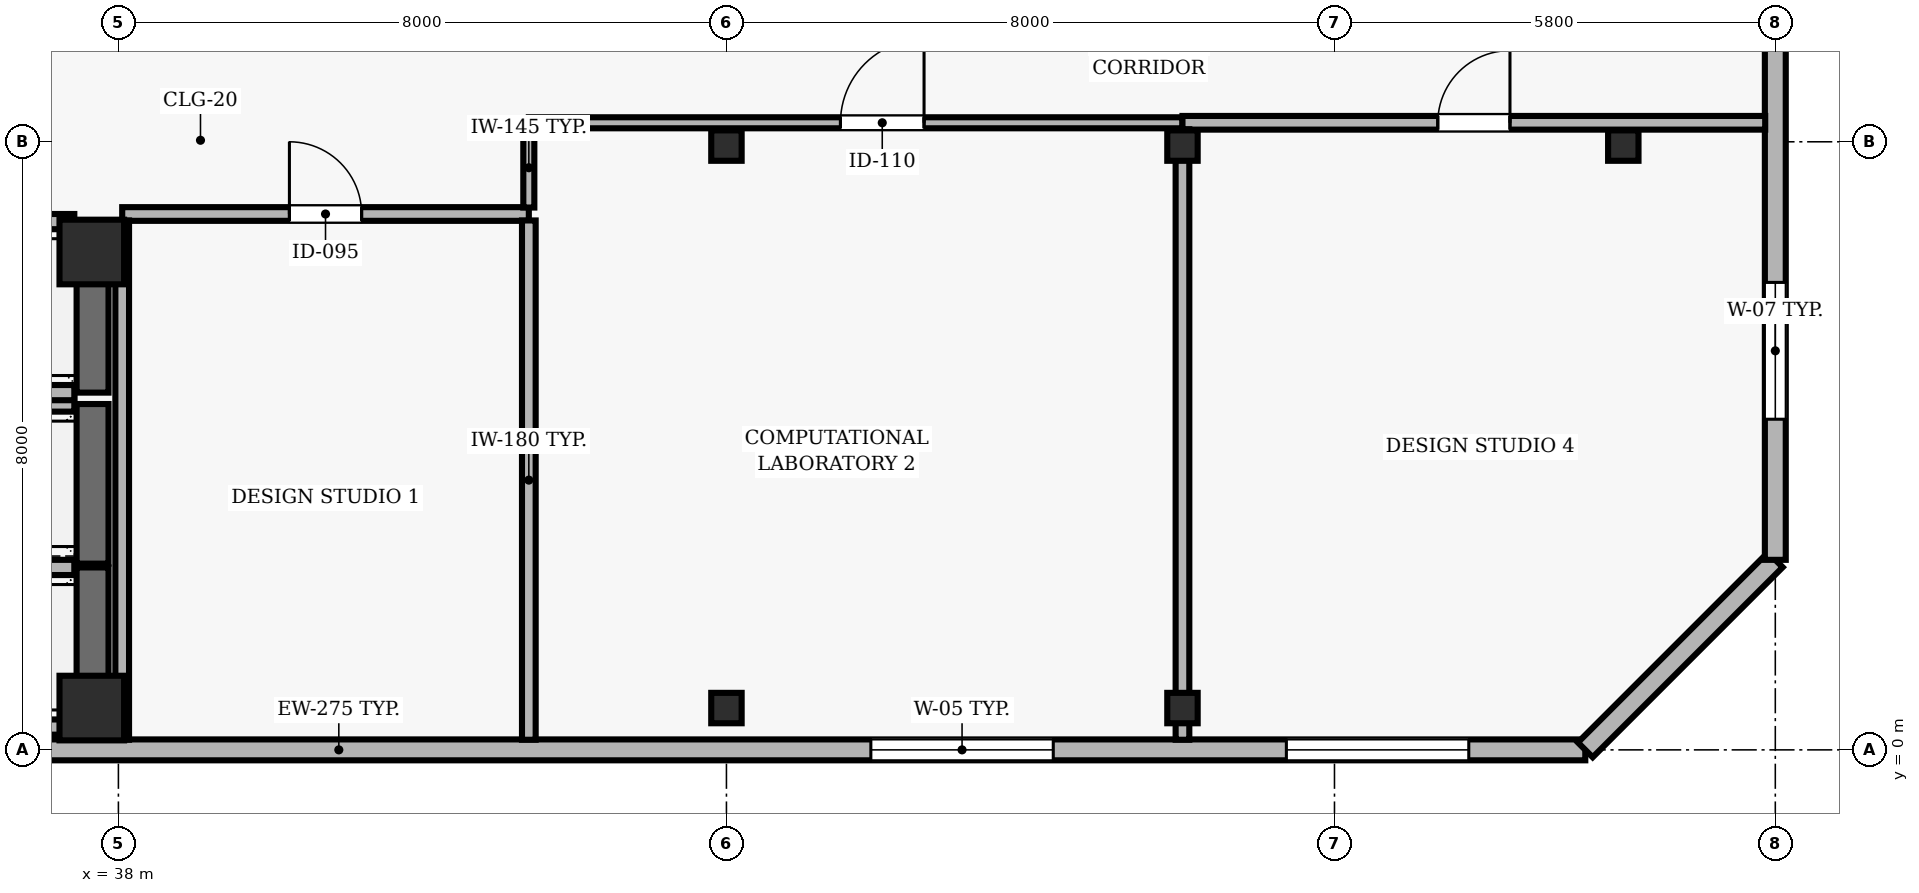
"""IFC4 building model, lengths in metres.
Left out: names, types, materials, properties, quantities, classifications, styles, units other than length and angle.
Written with IfcOpenShell. Run it as: python <this file> out.ifc"""

import sys

from ifc_helpers import new_model, si_unit, direction, frame, frame_2d, origin, origin_2d, place, context, subcontext, project, spatial, rectangle, hollow_rectangle, extrude, element, fill, save


model = new_model("IFC4")
c1 = context("Model", 3, precision=1e-05, world=origin(), true_north=direction((0.0, 1.0)))
c2 = subcontext(c1, "Body", "Model", "MODEL_VIEW")
j1 = project(units=[si_unit("LENGTHUNIT", "METRE"), si_unit("PLANEANGLEUNIT", "RADIAN")], contexts=[c1])
p1 = place(None, origin())
s1 = spatial("IfcSite", under=j1, at=p1, CompositionType="ELEMENT")
p2 = place(p1, origin())
s2 = spatial("IfcBuilding", under=s1, at=p2, CompositionType="ELEMENT")
p3 = place(p2, frame((0.0, 0.0, 263.8)))
s3 = spatial("IfcBuildingStorey", under=s2, at=p3, CompositionType="ELEMENT", Elevation=263.8)
for number, where, z_axis, x_axis in (
    (1, (37.65, 0.55, 0.0), (0.0, 0.0, 1.0), (1.0, 0.0, 0.0)),
    (2, (37.65, 6.55, 0.0), (0.0, 0.0, 1.0), (1.0, 0.0, 0.0)),
):
    element("IfcColumn", number, at=place(p3, frame(where, z_axis=z_axis, x_axis=x_axis)), inside=s3, PredefinedType="COLUMN", context=c2, shape_type="SweptSolid", body=[
        extrude(rectangle(XDim=0.85, YDim=0.85, at=origin_2d()), origin(), (0.0, 0.0, 1.0), 3.9),
    ])
for number, where, z_axis, x_axis in (
    (3, (46.0, 0.55, 0.0), (0.0, 0.0, 1.0), (1.0, 0.0, 0.0)),
    (4, (46.0, 7.95, 0.0), (0.0, 0.0, 1.0), (1.0, 0.0, 0.0)),
    (5, (52.0, 0.55, 0.0), (0.0, 0.0, 1.0), (1.0, 0.0, 0.0)),
    (6, (52.0, 7.95, 0.0), (0.0, 0.0, 1.0), (1.0, 0.0, 0.0)),
    (7, (57.8, 7.95, 0.0), (0.0, 0.0, 1.0), (1.0, 0.0, 0.0)),
):
    element("IfcColumn", number, at=place(p3, frame(where, z_axis=z_axis, x_axis=x_axis)), inside=s3, PredefinedType="COLUMN", context=c2, shape_type="SweptSolid", body=[
        extrude(hollow_rectangle(XDim=0.4, YDim=0.4, WallThickness=0.02, at=origin_2d()), origin(), (0.0, 0.0, 1.0), 3.9),
    ])
p4 = place(p3, frame((24.5, 0.0, 0.0), z_axis=(0.0, 0.0, 1.0), x_axis=(1.0, 0.0, 0.0)))
e8 = element("IfcWall", 8, at=p4, inside=s3, PredefinedType="SOLIDWALL", context=c2, shape_type="SweptSolid", body=[
    extrude(rectangle(XDim=32.8, YDim=0.275, at=frame_2d((16.4, 0.0))), origin(), (0.0, 0.0, 1.0), 3.69),
])
p5 = place(p4, frame((1.533, 0.0, 0.9)))
e9 = element("IfcOpeningElement", 9, at=p5, cuts=e8, PredefinedType="OPENING", context=c2, shape_type="SweptSolid", body=[
    extrude(rectangle(XDim=2.4, YDim=1.6, at=frame_2d((1.2, 0.8))), frame((0.0, 0.147, 0.0), z_axis=(0.0, -1.0, 0.0), x_axis=(1.0, 0.0, 0.0)), (0.0, 0.0, 1.0), 0.295),
])
p6 = place(p4, frame((23.4, 0.0, 0.9)))
e10 = element("IfcOpeningElement", 10, at=p6, cuts=e8, PredefinedType="OPENING", context=c2, shape_type="SweptSolid", body=[
    extrude(rectangle(XDim=2.4, YDim=1.6, at=frame_2d((1.2, 0.8))), frame((0.0, 0.147, 0.0), z_axis=(0.0, -1.0, 0.0), x_axis=(1.0, 0.0, 0.0)), (0.0, 0.0, 1.0), 0.295),
])
p7 = place(p4, frame((28.867, 0.0, 0.9)))
e11 = element("IfcOpeningElement", 11, at=p7, cuts=e8, PredefinedType="OPENING", context=c2, shape_type="SweptSolid", body=[
    extrude(rectangle(XDim=2.4, YDim=1.6, at=frame_2d((1.2, 0.8))), frame((0.0, 0.147, 0.0), z_axis=(0.0, -1.0, 0.0), x_axis=(1.0, 0.0, 0.0)), (0.0, 0.0, 1.0), 0.295),
])
p8 = place(p3, frame((57.3, 0.0, 0.0), z_axis=(0.0, 0.0, 1.0), x_axis=(0.707106781187, 0.707106781187, 0.0)))
e12 = element("IfcWall", 12, at=p8, inside=s3, PredefinedType="SOLIDWALL", context=c2, shape_type="SweptSolid", body=[
    extrude(rectangle(XDim=3.536, YDim=0.275, at=frame_2d((1.768, 0.0))), origin(), (0.0, 0.0, 1.0), 3.69),
])
p9 = place(p3, frame((59.8, 2.5, 0.0), z_axis=(0.0, 0.0, 1.0), x_axis=(0.0, 1.0, 0.0)))
e13 = element("IfcWall", 13, at=p9, inside=s3, PredefinedType="SOLIDWALL", context=c2, shape_type="SweptSolid", body=[
    extrude(rectangle(XDim=11.0, YDim=0.275, at=frame_2d((5.5, 0.0))), origin(), (0.0, 0.0, 1.0), 3.69),
])
p10 = place(p9, frame((1.85, 0.0, 0.9)))
e14 = element("IfcOpeningElement", 14, at=p10, cuts=e13, PredefinedType="OPENING", context=c2, shape_type="SweptSolid", body=[
    extrude(rectangle(XDim=1.8, YDim=1.8, at=frame_2d((0.9, 0.9))), frame((0.0, 0.147, 0.0), z_axis=(0.0, -1.0, 0.0), x_axis=(1.0, 0.0, 0.0)), (0.0, 0.0, 1.0), 0.295),
])
p11 = place(p3, frame((37.66, 0.3, 0.0), z_axis=(0.0, 0.0, 1.0), x_axis=(0.0, 1.0, 0.0)))
e15 = element("IfcWall", 15, at=p11, inside=s3, PredefinedType="SHEAR", context=c2, shape_type="SweptSolid", body=[
    extrude(rectangle(XDim=2.1, YDim=0.42, at=frame_2d((1.05, 0.0))), origin(), (0.0, 0.0, 1.0), 3.69),
])
for number, where, z_axis, x_axis in (
    (16, (35.28, 0.3, 0.0), (0.0, 0.0, 1.0), (1.0, 0.0, 0.0)),
    (17, (37.42, 2.4, 0.0), (0.0, 0.0, 1.0), (-1.0, 0.0, 0.0)),
):
    element("IfcWall", number, at=place(p3, frame(where, z_axis=z_axis, x_axis=x_axis)), inside=s3, PredefinedType="SOLIDWALL", context=c2, shape_type="SweptSolid", body=[
        extrude(rectangle(XDim=2.14, YDim=0.2, at=frame_2d((1.07, 0.0))), origin(), (0.0, 0.0, 1.0), 3.69),
    ])
p12 = place(p3, frame((37.66, 2.45, 0.0), z_axis=(0.0, 0.0, 1.0), x_axis=(0.0, 1.0, 0.0)))
e18 = element("IfcWall", 18, at=p12, inside=s3, PredefinedType="SHEAR", context=c2, shape_type="SweptSolid", body=[
    extrude(rectangle(XDim=2.1, YDim=0.42, at=frame_2d((1.05, 0.0))), origin(), (0.0, 0.0, 1.0), 3.69),
])
p13 = place(p3, frame((37.42, 4.55, 0.0), z_axis=(0.0, 0.0, 1.0), x_axis=(-1.0, 0.0, 0.0)))
e19 = element("IfcWall", 19, at=p13, inside=s3, PredefinedType="SOLIDWALL", context=c2, shape_type="SweptSolid", body=[
    extrude(rectangle(XDim=2.14, YDim=0.2, at=frame_2d((1.07, 0.0))), origin(), (0.0, 0.0, 1.0), 3.69),
])
p14 = place(p3, frame((37.66, 4.7, 0.0), z_axis=(0.0, 0.0, 1.0), x_axis=(0.0, 1.0, 0.0)))
e20 = element("IfcWall", 20, at=p14, inside=s3, PredefinedType="SHEAR", context=c2, shape_type="SweptSolid", body=[
    extrude(rectangle(XDim=2.25, YDim=0.42, at=frame_2d((1.125, 0.0))), origin(), (0.0, 0.0, 1.0), 3.69),
])
for number, where, z_axis, x_axis in (
    (21, (35.28, 4.7, 0.0), (0.0, 0.0, 1.0), (1.0, 0.0, 0.0)),
    (22, (37.42, 6.95, 0.0), (0.0, 0.0, 1.0), (-1.0, 0.0, 0.0)),
):
    element("IfcWall", number, at=place(p3, frame(where, z_axis=z_axis, x_axis=x_axis)), inside=s3, PredefinedType="SOLIDWALL", context=c2, shape_type="SweptSolid", body=[
        extrude(rectangle(XDim=2.14, YDim=0.2, at=frame_2d((1.07, 0.0))), origin(), (0.0, 0.0, 1.0), 3.69),
    ])
p15 = place(p3, frame((38.05, 7.05, 0.0), z_axis=(0.0, 0.0, 1.0), x_axis=(1.0, 0.0, 0.0)))
e23 = element("IfcWall", 23, at=p15, inside=s3, PredefinedType="PARTITIONING", context=c2, shape_type="SweptSolid", body=[
    extrude(rectangle(XDim=5.35, YDim=0.18, at=frame_2d((2.675, 0.0))), origin(), (0.0, 0.0, 1.0), 3.69),
])
p16 = place(p15, frame((2.2, 0.0, 0.0)))
e24 = element("IfcOpeningElement", 24, at=p16, cuts=e23, PredefinedType="OPENING", context=c2, shape_type="SweptSolid", body=[
    extrude(rectangle(XDim=0.95, YDim=2.1, at=frame_2d((0.475, 1.05))), frame((0.0, 0.1, 0.0), z_axis=(0.0, -1.0, 0.0), x_axis=(1.0, 0.0, 0.0)), (0.0, 0.0, 1.0), 0.2),
])
p17 = place(p3, frame((43.4, 8.25, 0.0), z_axis=(0.0, 0.0, 1.0), x_axis=(1.0, 0.0, 0.0)))
e25 = element("IfcWall", 25, at=p17, inside=s3, PredefinedType="PARTITIONING", context=c2, shape_type="SweptSolid", body=[
    extrude(rectangle(XDim=8.6, YDim=0.145, at=frame_2d((4.3, 0.0))), origin(), (0.0, 0.0, 1.0), 3.221),
])
p18 = place(p17, frame((4.1, 0.0, 0.0)))
e26 = element("IfcOpeningElement", 26, at=p18, cuts=e25, PredefinedType="OPENING", context=c2, shape_type="SweptSolid", body=[
    extrude(rectangle(XDim=1.1, YDim=2.15, at=frame_2d((0.55, 1.075))), frame((0.0, 0.083, 0.0), z_axis=(0.0, -1.0, 0.0), x_axis=(1.0, 0.0, 0.0)), (0.0, 0.0, 1.0), 0.165),
])
p19 = place(p3, frame((52.0, 8.25, 0.0), z_axis=(0.0, 0.0, 1.0), x_axis=(1.0, 0.0, 0.0)))
e27 = element("IfcWall", 27, at=p19, inside=s3, PredefinedType="PARTITIONING", context=c2, shape_type="SweptSolid", body=[
    extrude(rectangle(XDim=7.667, YDim=0.18, at=frame_2d((3.833, 0.0))), origin(), (0.0, 0.0, 1.0), 3.221),
])
p20 = place(p19, frame((3.359, 0.0, 0.0)))
e28 = element("IfcOpeningElement", 28, at=p20, cuts=e27, PredefinedType="OPENING", context=c2, shape_type="SweptSolid", body=[
    extrude(rectangle(XDim=0.95, YDim=2.1, at=frame_2d((0.475, 1.05))), frame((0.0, 0.1, 0.0), z_axis=(0.0, -1.0, 0.0), x_axis=(1.0, 0.0, 0.0)), (0.0, 0.0, 1.0), 0.2),
])
p21 = place(p3, frame((38.05, 6.965, 0.0), z_axis=(0.0, 0.0, 1.0), x_axis=(0.0, -1.0, 0.0)))
e29 = element("IfcWall", 29, at=p21, inside=s3, PredefinedType="PARTITIONING", context=c2, shape_type="SweptSolid", body=[
    extrude(rectangle(XDim=6.832, YDim=0.18, at=frame_2d((3.416, 0.0))), origin(), (0.0, 0.0, 1.0), 3.221),
])
p22 = place(p3, frame((43.4, 0.133, 0.0), z_axis=(0.0, 0.0, 1.0), x_axis=(0.0, 1.0, 0.0)))
e30 = element("IfcWall", 30, at=p22, inside=s3, PredefinedType="PARTITIONING", context=c2, shape_type="SweptSolid", body=[
    extrude(rectangle(XDim=6.832, YDim=0.18, at=frame_2d((3.416, 0.0))), origin(), (0.0, 0.0, 1.0), 3.69),
])
p23 = place(p3, frame((43.4, 7.135, 0.0), z_axis=(0.0, 0.0, 1.0), x_axis=(0.0, 1.0, 0.0)))
e31 = element("IfcWall", 31, at=p23, inside=s3, PredefinedType="PARTITIONING", context=c2, shape_type="SweptSolid", body=[
    extrude(rectangle(XDim=1.047, YDim=0.145, at=frame_2d((0.523, 0.0))), origin(), (0.0, 0.0, 1.0), 3.69),
])
p24 = place(p3, frame((52.0, 0.133, 0.0), z_axis=(0.0, 0.0, 1.0), x_axis=(0.0, 1.0, 0.0)))
e32 = element("IfcWall", 32, at=p24, inside=s3, PredefinedType="PARTITIONING", context=c2, shape_type="SweptSolid", body=[
    extrude(rectangle(XDim=8.032, YDim=0.18, at=frame_2d((4.016, 0.0))), origin(), (0.0, 0.0, 1.0), 3.221),
])
p25 = place(p6, origin())
e33 = element("IfcWindow", 33, at=p25, inside=s3, PartitioningType="SINGLE_PANEL", PredefinedType="WINDOW", context=c2, shape_type="SweptSolid", body=[
    extrude(rectangle(XDim=2.4, YDim=1.6, at=frame_2d((1.2, 0.8))), frame((0.0, 0.03, 0.0), z_axis=(0.0, -1.0, 0.0), x_axis=(1.0, 0.0, 0.0)), (0.0, 0.0, 1.0), 0.06),
])
fill(e10, e33)
p26 = place(p7, origin())
e34 = element("IfcWindow", 34, at=p26, inside=s3, PartitioningType="SINGLE_PANEL", PredefinedType="WINDOW", context=c2, shape_type="SweptSolid", body=[
    extrude(rectangle(XDim=2.4, YDim=1.6, at=frame_2d((1.2, 0.8))), frame((0.0, 0.03, 0.0), z_axis=(0.0, -1.0, 0.0), x_axis=(1.0, 0.0, 0.0)), (0.0, 0.0, 1.0), 0.06),
])
fill(e11, e34)
p27 = place(p10, origin())
e35 = element("IfcWindow", 35, at=p27, inside=s3, PartitioningType="SINGLE_PANEL", PredefinedType="WINDOW", context=c2, shape_type="SweptSolid", body=[
    extrude(rectangle(XDim=1.8, YDim=1.8, at=frame_2d((0.9, 0.9))), frame((0.0, 0.03, 0.0), z_axis=(0.0, -1.0, 0.0), x_axis=(1.0, 0.0, 0.0)), (0.0, 0.0, 1.0), 0.06),
])
fill(e14, e35)
p28 = place(p16, origin())
e36 = element("IfcDoor", 36, at=p28, inside=s3, OperationType="SINGLE_SWING_LEFT", PredefinedType="DOOR", context=c2, shape_type="SweptSolid", body=[
    extrude(rectangle(XDim=0.95, YDim=2.1, at=frame_2d((0.475, 1.05))), frame((0.0, 0.025, 0.0), z_axis=(0.0, -1.0, 0.0), x_axis=(1.0, 0.0, 0.0)), (0.0, 0.0, 1.0), 0.05),
])
fill(e24, e36)
p29 = place(p18, origin())
e37 = element("IfcDoor", 37, at=p29, inside=s3, OperationType="SINGLE_SWING_RIGHT", PredefinedType="DOOR", context=c2, shape_type="SweptSolid", body=[
    extrude(rectangle(XDim=1.1, YDim=2.15, at=frame_2d((0.55, 1.075))), frame((0.0, 0.025, 0.0), z_axis=(0.0, -1.0, 0.0), x_axis=(1.0, 0.0, 0.0)), (0.0, 0.0, 1.0), 0.05),
])
fill(e26, e37)
p30 = place(p20, origin())
e38 = element("IfcDoor", 38, at=p30, inside=s3, OperationType="SINGLE_SWING_RIGHT", PredefinedType="DOOR", context=c2, shape_type="SweptSolid", body=[
    extrude(rectangle(XDim=0.95, YDim=2.1, at=frame_2d((0.475, 1.05))), frame((0.0, 0.025, 0.0), z_axis=(0.0, -1.0, 0.0), x_axis=(1.0, 0.0, 0.0)), (0.0, 0.0, 1.0), 0.05),
])
fill(e28, e38)
save(model, sys.argv[1])
